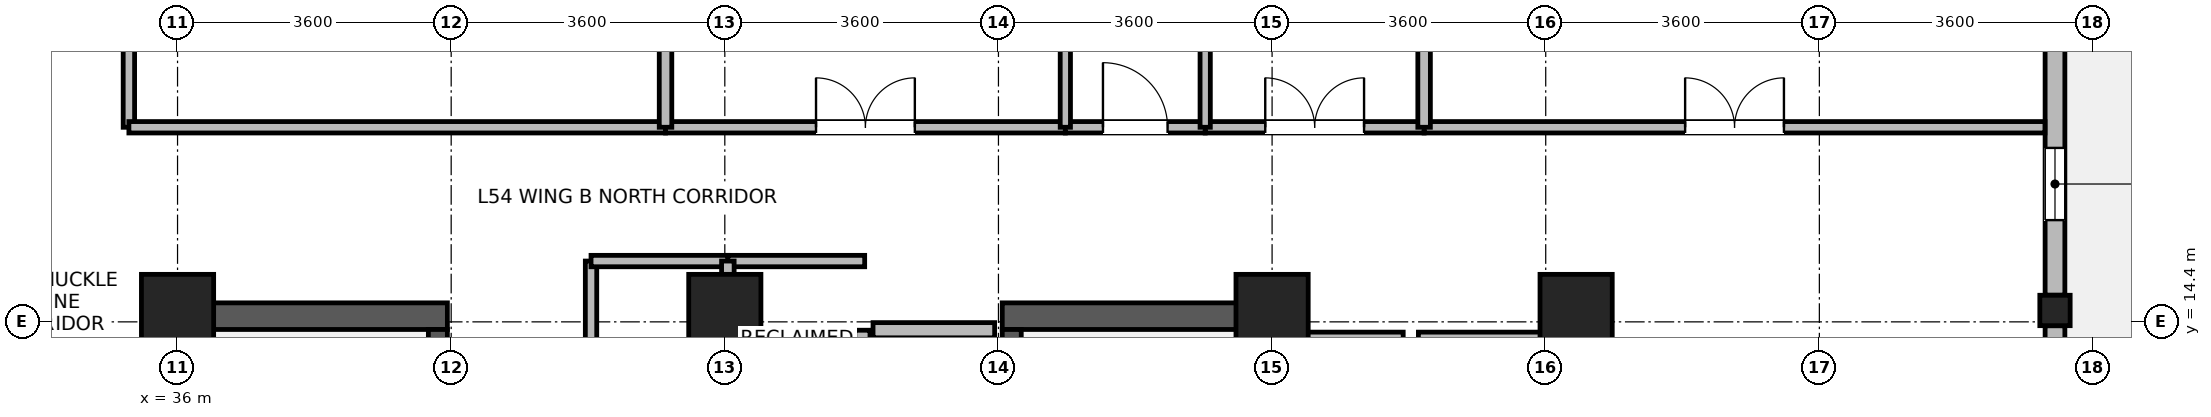
"""IFC4 building model, lengths in metres.
Left out: names, types, materials, properties, quantities, classifications, styles, units other than length and angle.
Written with IfcOpenShell. Run it as: python <this file> out.ifc"""

import sys

from ifc_helpers import new_model, si_unit, direction, frame, frame_2d, origin, origin_2d, place, context, subcontext, project, spatial, rectangle, i_section, extrude, source, transform, mapped, element, fill, save


model = new_model("IFC4")
c1 = context("Model", 3, precision=1e-05, world=origin(), true_north=direction((0.0, 1.0)))
c2 = subcontext(c1, "Body", "Model", "MODEL_VIEW")
j1 = project(units=[si_unit("LENGTHUNIT", "METRE"), si_unit("PLANEANGLEUNIT", "RADIAN")], contexts=[c1])
p1 = place(None, origin())
s1 = spatial("IfcSite", under=j1, at=p1, CompositionType="ELEMENT")
p2 = place(p1, origin())
s2 = spatial("IfcBuilding", under=s1, at=p2, CompositionType="ELEMENT")
p3 = place(p2, frame((0.0, 0.0, 212.9)))
s3 = spatial("IfcBuildingStorey", under=s2, at=p3, CompositionType="ELEMENT", Elevation=212.9)
for number, where, z_axis, x_axis in (
    (1, (36.175, 6.95, 0.0), (0.0, 0.0, 1.0), (0.0, 1.0, 0.0)),
    (2, (50.225, 6.95, 0.0), (0.0, 0.0, 1.0), (0.0, 1.0, 0.0)),
):
    element("IfcWall", number, at=place(p3, frame(where, z_axis=z_axis, x_axis=x_axis)), inside=s3, PredefinedType="SHEAR", context=c2, shape_type="SweptSolid", body=[
        extrude(rectangle(XDim=7.7, YDim=0.35, at=frame_2d((3.85, 0.0))), origin(), (0.0, 0.0, 1.0), 3.47),
    ])
for number, where, z_axis, x_axis in (
    (3, (36.35, 14.475, 0.0), (0.0, 0.0, 1.0), (1.0, 0.0, 0.0)),
    (4, (46.85, 14.475, 0.0), (0.0, 0.0, 1.0), (1.0, 0.0, 0.0)),
):
    element("IfcWall", number, at=place(p3, frame(where, z_axis=z_axis, x_axis=x_axis)), inside=s3, PredefinedType="SHEAR", context=c2, shape_type="SweptSolid", body=[
        extrude(rectangle(XDim=3.2, YDim=0.35, at=frame_2d((1.6, 0.0))), origin(), (0.0, 0.0, 1.0), 3.47),
    ])
p4 = place(p3, frame((39.425, 7.3, 0.0), z_axis=(0.0, 0.0, 1.0), x_axis=(0.0, 1.0, 0.0)))
e5 = element("IfcWall", 5, at=p4, inside=s3, PredefinedType="SHEAR", context=c2, shape_type="SweptSolid", body=[
    extrude(rectangle(XDim=7.0, YDim=0.25, at=frame_2d((3.5, 0.0))), origin(), (0.0, 0.0, 1.0), 3.47),
])
p5 = place(p4, frame((0.15, 0.0, 0.0)))
e6 = element("IfcOpeningElement", 6, at=p5, cuts=e5, PredefinedType="OPENING", context=c2, shape_type="SweptSolid", body=[
    extrude(rectangle(XDim=1.1, YDim=2.08, at=frame_2d((0.55, 1.04))), frame((0.0, 0.135, 0.0), z_axis=(0.0, -1.0, 0.0), x_axis=(1.0, 0.0, 0.0)), (0.0, 0.0, 1.0), 0.27),
])
p6 = place(p3, frame((46.975, 7.3, 0.0), z_axis=(0.0, 0.0, 1.0), x_axis=(0.0, 1.0, 0.0)))
e7 = element("IfcWall", 7, at=p6, inside=s3, PredefinedType="SHEAR", context=c2, shape_type="SweptSolid", body=[
    extrude(rectangle(XDim=7.0, YDim=0.25, at=frame_2d((3.5, 0.0))), origin(), (0.0, 0.0, 1.0), 3.47),
])
p7 = place(p6, frame((0.15, 0.0, 0.0)))
e8 = element("IfcOpeningElement", 8, at=p7, cuts=e7, PredefinedType="OPENING", context=c2, shape_type="SweptSolid", body=[
    extrude(rectangle(XDim=1.1, YDim=2.08, at=frame_2d((0.55, 1.04))), frame((0.0, 0.135, 0.0), z_axis=(0.0, -1.0, 0.0), x_axis=(1.0, 0.0, 0.0)), (0.0, 0.0, 1.0), 0.27),
])
m1 = source(origin(), c2, "Body", "SweptSolid", [
    extrude(rectangle(XDim=0.95, YDim=0.95, at=origin_2d()), origin(), (0.0, 0.0, 1.0), 3.7),
])
for number, where, z_axis, x_axis in (
    (9, (36.0, 14.55, 0.0), (0.0, 0.0, 1.0), (1.0, 0.0, 0.0)),
    (10, (43.2, 14.55, 0.0), (0.0, 0.0, 1.0), (1.0, 0.0, 0.0)),
    (11, (50.4, 14.55, 0.0), (0.0, 0.0, 1.0), (1.0, 0.0, 0.0)),
    (12, (54.4, 14.55, 0.0), (0.0, 0.0, 1.0), (1.0, 0.0, 0.0)),
):
    element("IfcColumn", number, at=place(p3, frame(where, z_axis=z_axis, x_axis=x_axis)), inside=s3, PredefinedType="COLUMN", context=c2, shape_type="MappedRepresentation", body=[
        mapped(m1, transform((0.0, 0.0, 0.0), x_axis=(1.0, 0.0, 0.0), y_axis=(0.0, 1.0, 0.0), z_axis=(0.0, 0.0, 1.0), scale=1.0)),
    ])
m2 = source(origin(), c2, "Body", "SweptSolid", [
    extrude(i_section(OverallWidth=0.399, OverallDepth=0.4, WebThickness=0.017, FlangeThickness=0.023, FilletRadius=0.015, at=origin_2d()), origin(), (0.0, 0.0, 1.0), 3.7),
])
p8 = place(p3, frame((60.7, 14.55, 0.0), z_axis=(0.0, 0.0, 1.0), x_axis=(1.0, 0.0, 0.0)))
e13 = element("IfcColumn", 13, at=p8, inside=s3, PredefinedType="COLUMN", context=c2, shape_type="MappedRepresentation", body=[
    mapped(m2, transform((0.0, 0.0, 0.0), x_axis=(1.0, 0.0, 0.0), y_axis=(0.0, 1.0, 0.0), z_axis=(0.0, 0.0, 1.0), scale=1.0)),
])
p9 = place(p3, frame((60.7, 14.349, 0.0), z_axis=(0.0, 0.0, 1.0), x_axis=(0.0, -1.0, 0.0)))
e14 = element("IfcWall", 14, at=p9, inside=s3, PredefinedType="STANDARD", context=c2, shape_type="SweptSolid", body=[
    extrude(rectangle(XDim=7.098, YDim=0.26, at=frame_2d((3.549, 0.0))), origin(), (0.0, 0.0, 1.0), 3.05),
])
p10 = place(p9, frame((2.799, 0.0, 0.0)))
e15 = element("IfcOpeningElement", 15, at=p10, cuts=e14, PredefinedType="OPENING", context=c2, shape_type="SweptSolid", body=[
    extrude(rectangle(XDim=1.5, YDim=2.15, at=frame_2d((0.75, 1.075))), frame((0.0, 0.14, 0.0), z_axis=(0.0, -1.0, 0.0), x_axis=(1.0, 0.0, 0.0)), (0.0, 0.0, 1.0), 0.28),
])
p11 = place(p3, frame((60.7, 21.399, 0.0), z_axis=(0.0, 0.0, 1.0), x_axis=(0.0, -1.0, 0.0)))
e16 = element("IfcWall", 16, at=p11, inside=s3, PredefinedType="STANDARD", context=c2, shape_type="SweptSolid", body=[
    extrude(rectangle(XDim=6.648, YDim=0.26, at=frame_2d((3.324, 0.0))), origin(), (0.0, 0.0, 1.0), 3.05),
])
p12 = place(p11, frame((0.762, 0.0, 0.85)))
e17 = element("IfcOpeningElement", 17, at=p12, cuts=e16, PredefinedType="OPENING", context=c2, shape_type="SweptSolid", body=[
    extrude(rectangle(XDim=1.8, YDim=1.85, at=frame_2d((0.9, 0.925))), frame((0.0, 0.14, 0.0), z_axis=(0.0, -1.0, 0.0), x_axis=(1.0, 0.0, 0.0)), (0.0, 0.0, 1.0), 0.28),
])
p13 = place(p11, frame((4.71, 0.0, 0.85)))
e18 = element("IfcOpeningElement", 18, at=p13, cuts=e16, PredefinedType="OPENING", context=c2, shape_type="SweptSolid", body=[
    extrude(rectangle(XDim=0.95, YDim=1.75, at=frame_2d((0.475, 0.875))), frame((0.0, 0.14, 0.0), z_axis=(0.0, -1.0, 0.0), x_axis=(1.0, 0.0, 0.0)), (0.0, 0.0, 1.0), 0.28),
])
p14 = place(p3, frame((50.475, 14.165, 0.0), z_axis=(0.0, 0.0, 1.0), x_axis=(1.0, 0.0, 0.0)))
e19 = element("IfcWall", 19, at=p14, inside=s3, PredefinedType="PARTITIONING", context=c2, shape_type="SweptSolid", body=[
    extrude(rectangle(XDim=1.65, YDim=0.2, at=frame_2d((0.825, 0.0))), origin(), (0.0, 0.0, 1.0), 3.45),
])
p15 = place(p3, frame((52.325, 14.165, 0.0), z_axis=(0.0, 0.0, 1.0), x_axis=(1.0, 0.0, 0.0)))
e20 = element("IfcWall", 20, at=p15, inside=s3, PredefinedType="PARTITIONING", context=c2, shape_type="SweptSolid", body=[
    extrude(rectangle(XDim=1.65, YDim=0.2, at=frame_2d((0.825, 0.0))), origin(), (0.0, 0.0, 1.0), 3.45),
])
p16 = place(p3, frame((45.15, 14.29, 0.0), z_axis=(0.0, 0.0, 1.0), x_axis=(1.0, 0.0, 0.0)))
e21 = element("IfcWall", 21, at=p16, inside=s3, PredefinedType="PARTITIONING", context=c2, shape_type="SweptSolid", body=[
    extrude(rectangle(XDim=1.6, YDim=0.2, at=frame_2d((0.8, 0.0))), origin(), (0.0, 0.0, 1.0), 2.55),
])
p17 = place(p3, frame((45.01, 11.61, 0.0), z_axis=(0.0, 0.0, 1.0), x_axis=(0.0, 1.0, 0.0)))
e22 = element("IfcWall", 22, at=p17, inside=s3, PredefinedType="PARTITIONING", context=c2, shape_type="SweptSolid", body=[
    extrude(rectangle(XDim=2.68, YDim=0.2, at=frame_2d((1.34, 0.0))), origin(), (0.0, 0.0, 1.0), 3.45),
])
p18 = place(p3, frame((35.36, 16.96, 0.0), z_axis=(0.0, 0.0, 1.0), x_axis=(0.0, 1.0, 0.0)))
e23 = element("IfcWall", 23, at=p18, inside=s3, PredefinedType="PARTITIONING", context=c2, shape_type="SweptSolid", body=[
    extrude(rectangle(XDim=9.8, YDim=0.15, at=frame_2d((4.9, 0.0))), origin(), (0.0, 0.0, 1.0), 3.45),
])
p19 = place(p18, frame((2.486, 0.0, 0.0)))
e24 = element("IfcOpeningElement", 24, at=p19, cuts=e23, PredefinedType="OPENING", context=c2, shape_type="SweptSolid", body=[
    extrude(rectangle(XDim=1.3, YDim=2.12, at=frame_2d((0.65, 1.06))), frame((0.0, 0.085, 0.0), z_axis=(0.0, -1.0, 0.0), x_axis=(1.0, 0.0, 0.0)), (0.0, 0.0, 1.0), 0.17),
])
p20 = place(p3, frame((52.4, 16.96, 0.0), z_axis=(0.0, 0.0, 1.0), x_axis=(1.0, 0.0, 0.0)))
e25 = element("IfcWall", 25, at=p20, inside=s3, PredefinedType="PARTITIONING", context=c2, shape_type="SweptSolid", body=[
    extrude(rectangle(XDim=8.168, YDim=0.15, at=frame_2d((4.084, 0.0))), origin(), (0.0, 0.0, 1.0), 3.45),
])
p21 = place(p20, frame((3.434, 0.0, 0.0)))
e26 = element("IfcOpeningElement", 26, at=p21, cuts=e25, PredefinedType="OPENING", context=c2, shape_type="SweptSolid", body=[
    extrude(rectangle(XDim=1.3, YDim=2.12, at=frame_2d((0.65, 1.06))), frame((0.0, 0.085, 0.0), z_axis=(0.0, -1.0, 0.0), x_axis=(1.0, 0.0, 0.0)), (0.0, 0.0, 1.0), 0.17),
])
p22 = place(p3, frame((35.36, 16.96, 0.0), z_axis=(0.0, 0.0, 1.0), x_axis=(1.0, 0.0, 0.0)))
e27 = element("IfcWall", 27, at=p22, inside=s3, PredefinedType="PARTITIONING", context=c2, shape_type="SweptSolid", body=[
    extrude(rectangle(XDim=7.06, YDim=0.15, at=frame_2d((3.53, 0.0))), origin(), (0.0, 0.0, 1.0), 3.45),
])
p23 = place(p3, frame((42.42, 16.96, 0.0), z_axis=(0.0, 0.0, 1.0), x_axis=(1.0, 0.0, 0.0)))
e28 = element("IfcWall", 28, at=p23, inside=s3, PredefinedType="PARTITIONING", context=c2, shape_type="SweptSolid", body=[
    extrude(rectangle(XDim=5.26, YDim=0.15, at=frame_2d((2.63, 0.0))), origin(), (0.0, 0.0, 1.0), 3.45),
])
p24 = place(p23, frame((1.98, 0.0, 0.0)))
e29 = element("IfcOpeningElement", 29, at=p24, cuts=e28, PredefinedType="OPENING", context=c2, shape_type="SweptSolid", body=[
    extrude(rectangle(XDim=1.3, YDim=2.12, at=frame_2d((0.65, 1.06))), frame((0.0, 0.085, 0.0), z_axis=(0.0, -1.0, 0.0), x_axis=(1.0, 0.0, 0.0)), (0.0, 0.0, 1.0), 0.17),
])
p25 = place(p3, frame((41.44, 11.64, 0.0), z_axis=(0.0, 0.0, 1.0), x_axis=(0.0, 1.0, 0.0)))
e30 = element("IfcWall", 30, at=p25, inside=s3, PredefinedType="PARTITIONING", context=c2, shape_type="SweptSolid", body=[
    extrude(rectangle(XDim=3.56, YDim=0.15, at=frame_2d((1.78, 0.0))), origin(), (0.0, 0.0, 1.0), 3.45),
])
p26 = place(p25, frame((1.13, 0.0, 0.0)))
e31 = element("IfcOpeningElement", 31, at=p26, cuts=e30, PredefinedType="OPENING", context=c2, shape_type="SweptSolid", body=[
    extrude(rectangle(XDim=1.3, YDim=2.12, at=frame_2d((0.65, 1.06))), frame((0.0, 0.085, 0.0), z_axis=(0.0, -1.0, 0.0), x_axis=(1.0, 0.0, 0.0)), (0.0, 0.0, 1.0), 0.17),
])
p27 = place(p3, frame((49.52, 16.96, 0.0), z_axis=(0.0, 0.0, 1.0), x_axis=(1.0, 0.0, 0.0)))
e32 = element("IfcWall", 32, at=p27, inside=s3, PredefinedType="PARTITIONING", context=c2, shape_type="SweptSolid", body=[
    extrude(rectangle(XDim=2.88, YDim=0.15, at=frame_2d((1.44, 0.0))), origin(), (0.0, 0.0, 1.0), 3.45),
])
p28 = place(p27, frame((0.79, 0.0, 0.0)))
e33 = element("IfcOpeningElement", 33, at=p28, cuts=e32, PredefinedType="OPENING", context=c2, shape_type="SweptSolid", body=[
    extrude(rectangle(XDim=1.3, YDim=2.12, at=frame_2d((0.65, 1.06))), frame((0.0, 0.085, 0.0), z_axis=(0.0, -1.0, 0.0), x_axis=(1.0, 0.0, 0.0)), (0.0, 0.0, 1.0), 0.17),
])
p29 = place(p3, frame((47.68, 16.96, 0.0), z_axis=(0.0, 0.0, 1.0), x_axis=(1.0, 0.0, 0.0)))
e34 = element("IfcWall", 34, at=p29, inside=s3, PredefinedType="PARTITIONING", context=c2, shape_type="SweptSolid", body=[
    extrude(rectangle(XDim=1.84, YDim=0.15, at=frame_2d((0.92, 0.0))), origin(), (0.0, 0.0, 1.0), 3.45),
])
p30 = place(p29, frame((0.495, 0.0, 0.0)))
e35 = element("IfcOpeningElement", 35, at=p30, cuts=e34, PredefinedType="OPENING", context=c2, shape_type="SweptSolid", body=[
    extrude(rectangle(XDim=0.85, YDim=2.04, at=frame_2d((0.425, 1.02))), frame((0.0, 0.085, 0.0), z_axis=(0.0, -1.0, 0.0), x_axis=(1.0, 0.0, 0.0)), (0.0, 0.0, 1.0), 0.17),
])
for number, where, z_axis, x_axis in (
    (36, (41.44, 15.2, 0.0), (0.0, 0.0, 1.0), (1.0, 0.0, 0.0)),
    (37, (43.24, 15.2, 0.0), (0.0, 0.0, 1.0), (1.0, 0.0, 0.0)),
):
    element("IfcWall", number, at=place(p3, frame(where, z_axis=z_axis, x_axis=x_axis)), inside=s3, PredefinedType="PARTITIONING", context=c2, shape_type="SweptSolid", body=[
        extrude(rectangle(XDim=1.8, YDim=0.15, at=frame_2d((0.9, 0.0))), origin(), (0.0, 0.0, 1.0), 3.45),
    ])
p31 = place(p3, frame((42.42, 16.96, 0.0), z_axis=(0.0, 0.0, 1.0), x_axis=(0.0, 1.0, 0.0)))
e38 = element("IfcWall", 38, at=p31, inside=s3, PredefinedType="PARTITIONING", context=c2, shape_type="SweptSolid", body=[
    extrude(rectangle(XDim=9.8, YDim=0.165, at=frame_2d((4.9, 0.0))), origin(), (0.0, 0.0, 1.0), 3.45),
])
for number, where, z_axis, x_axis in (
    (39, (47.68, 16.96, 0.0), (0.0, 0.0, 1.0), (0.0, 1.0, 0.0)),
    (40, (49.52, 16.96, 0.0), (0.0, 0.0, 1.0), (0.0, 1.0, 0.0)),
):
    element("IfcWall", number, at=place(p3, frame(where, z_axis=z_axis, x_axis=x_axis)), inside=s3, PredefinedType="PARTITIONING", context=c2, shape_type="SweptSolid", body=[
        extrude(rectangle(XDim=9.8, YDim=0.135, at=frame_2d((4.9, 0.0))), origin(), (0.0, 0.0, 1.0), 3.45),
    ])
p32 = place(p3, frame((52.4, 16.96, 0.0), z_axis=(0.0, 0.0, 1.0), x_axis=(0.0, 1.0, 0.0)))
e41 = element("IfcWall", 41, at=p32, inside=s3, PredefinedType="PARTITIONING", context=c2, shape_type="SweptSolid", body=[
    extrude(rectangle(XDim=9.8, YDim=0.165, at=frame_2d((4.9, 0.0))), origin(), (0.0, 0.0, 1.0), 3.45),
])
p33 = place(p3, frame((43.24, 11.64, 0.0), z_axis=(0.0, 0.0, 1.0), x_axis=(0.0, 1.0, 0.0)))
e42 = element("IfcWall", 42, at=p33, inside=s3, PredefinedType="PARTITIONING", context=c2, shape_type="SweptSolid", body=[
    extrude(rectangle(XDim=3.56, YDim=0.165, at=frame_2d((1.78, 0.0))), origin(), (0.0, 0.0, 1.0), 3.45),
])
p34 = place(p13, origin())
e43 = element("IfcWindow", 43, at=p34, inside=s3, PartitioningType="SINGLE_PANEL", PredefinedType="WINDOW", context=c2, shape_type="SweptSolid", body=[
    extrude(rectangle(XDim=0.95, YDim=1.75, at=frame_2d((0.475, 0.875))), frame((0.0, 0.03, 0.0), z_axis=(0.0, -1.0, 0.0), x_axis=(1.0, 0.0, 0.0)), (0.0, 0.0, 1.0), 0.06),
])
fill(e18, e43)
p35 = place(p21, origin())
e44 = element("IfcDoor", 44, at=p35, inside=s3, OperationType="DOUBLE_DOOR_SINGLE_SWING", PredefinedType="DOOR", context=c2, shape_type="SweptSolid", body=[
    extrude(rectangle(XDim=1.3, YDim=2.12, at=frame_2d((0.65, 1.06))), frame((0.0, 0.025, 0.0), z_axis=(0.0, -1.0, 0.0), x_axis=(1.0, 0.0, 0.0)), (0.0, 0.0, 1.0), 0.05),
])
fill(e26, e44)
p36 = place(p24, origin())
e45 = element("IfcDoor", 45, at=p36, inside=s3, OperationType="DOUBLE_DOOR_SINGLE_SWING", PredefinedType="DOOR", context=c2, shape_type="SweptSolid", body=[
    extrude(rectangle(XDim=1.3, YDim=2.12, at=frame_2d((0.65, 1.06))), frame((0.0, 0.025, 0.0), z_axis=(0.0, -1.0, 0.0), x_axis=(1.0, 0.0, 0.0)), (0.0, 0.0, 1.0), 0.05),
])
fill(e29, e45)
p37 = place(p28, origin())
e46 = element("IfcDoor", 46, at=p37, inside=s3, OperationType="DOUBLE_DOOR_SINGLE_SWING", PredefinedType="DOOR", context=c2, shape_type="SweptSolid", body=[
    extrude(rectangle(XDim=1.3, YDim=2.12, at=frame_2d((0.65, 1.06))), frame((0.0, 0.025, 0.0), z_axis=(0.0, -1.0, 0.0), x_axis=(1.0, 0.0, 0.0)), (0.0, 0.0, 1.0), 0.05),
])
fill(e33, e46)
p38 = place(p30, origin())
e47 = element("IfcDoor", 47, at=p38, inside=s3, OperationType="SINGLE_SWING_LEFT", PredefinedType="DOOR", context=c2, shape_type="SweptSolid", body=[
    extrude(rectangle(XDim=0.85, YDim=2.04, at=frame_2d((0.425, 1.02))), frame((0.0, 0.025, 0.0), z_axis=(0.0, -1.0, 0.0), x_axis=(1.0, 0.0, 0.0)), (0.0, 0.0, 1.0), 0.05),
])
fill(e35, e47)
save(model, sys.argv[1])
